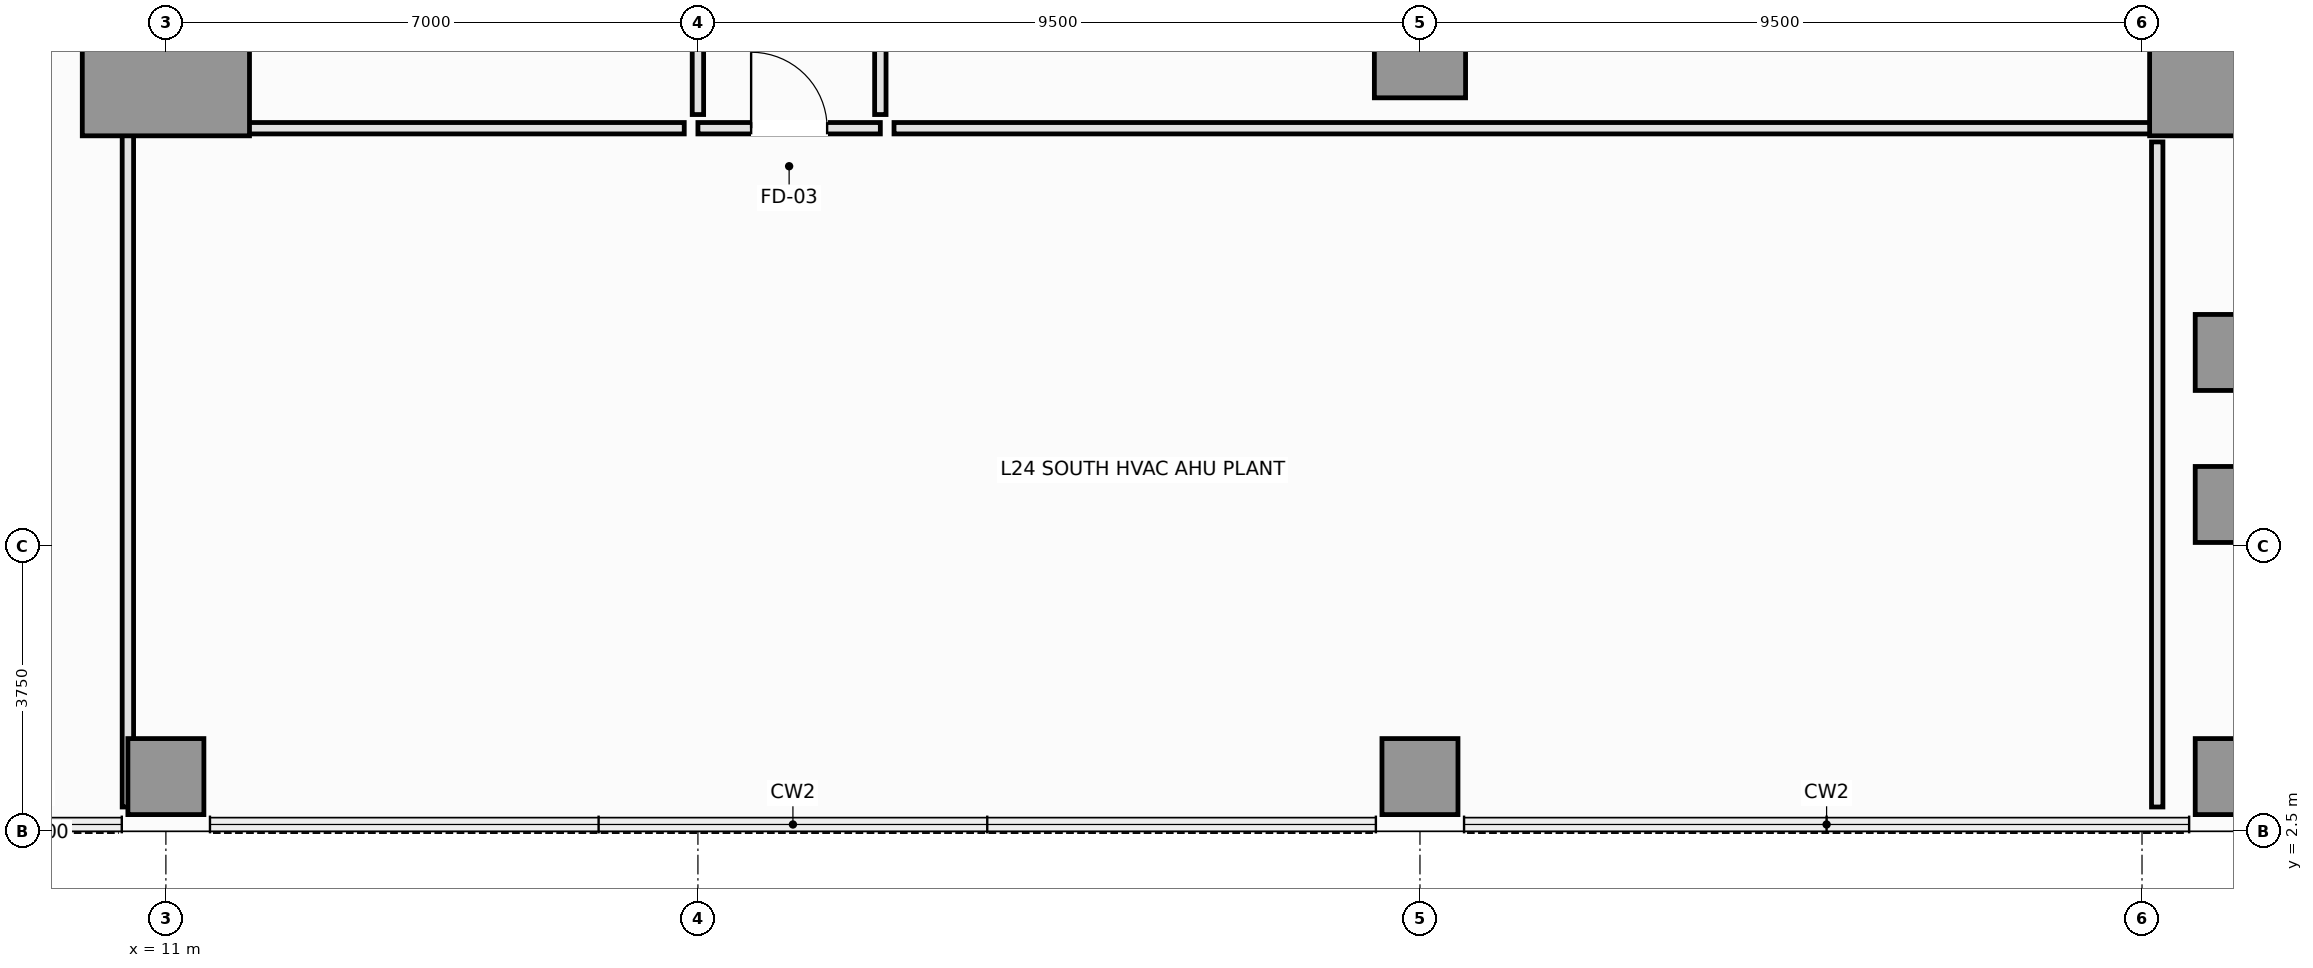
"""IFC4 building model, lengths in metres.
Left out: names, types, materials, properties, quantities, classifications, styles, units other than length and angle.
Written with IfcOpenShell. Run it as: python <this file> out.ifc"""

import sys

from ifc_helpers import new_model, si_unit, direction, frame, frame_2d, origin, origin_2d, place, context, subcontext, project, spatial, rectangle, extrude, element, fill, save


model = new_model("IFC4")
c1 = context("Model", 3, precision=1e-05, world=origin(), true_north=direction((0.0, 1.0)))
c2 = subcontext(c1, "Body", "Model", "MODEL_VIEW")
j1 = project(units=[si_unit("LENGTHUNIT", "METRE"), si_unit("PLANEANGLEUNIT", "RADIAN")], contexts=[c1])
p1 = place(None, origin())
s1 = spatial("IfcSite", under=j1, at=p1, CompositionType="ELEMENT")
p2 = place(p1, origin())
s2 = spatial("IfcBuilding", under=s1, at=p2, CompositionType="ELEMENT")
p3 = place(p2, frame((0.0, 0.0, 93.05)))
s3 = spatial("IfcBuildingStorey", under=s2, at=p3, CompositionType="ELEMENT", Elevation=93.05)
for number, where, z_axis, x_axis in (
    (1, (11.0, 12.75, 0.0), (0.0, 0.0, 1.0), (1.0, 0.0, 0.0)),
    (2, (38.2, 12.75, 0.0), (0.0, 0.0, 1.0), (1.0, 0.0, 0.0)),
):
    element("IfcColumn", number, at=place(p3, frame(where, z_axis=z_axis, x_axis=x_axis)), inside=s3, PredefinedType="COLUMN", context=c2, shape_type="SweptSolid", body=[
        extrude(rectangle(XDim=2.2, YDim=2.2, at=origin_2d()), origin(), (0.0, 0.0, 1.0), 4.8),
    ])
p4 = place(p3, frame((27.5, 12.75, 0.0), z_axis=(0.0, 0.0, 1.0), x_axis=(1.0, 0.0, 0.0)))
e3 = element("IfcColumn", 3, at=p4, inside=s3, PredefinedType="COLUMN", context=c2, shape_type="SweptSolid", body=[
    extrude(rectangle(XDim=1.2, YDim=1.2, at=origin_2d()), origin(), (0.0, 0.0, 1.0), 4.8),
])
for number, where, z_axis, x_axis in (
    (4, (38.2, 6.8, 0.0), (0.0, 0.0, 1.0), (1.0, 0.0, 0.0)),
    (5, (38.2, 8.8, 0.0), (0.0, 0.0, 1.0), (1.0, 0.0, 0.0)),
    (6, (11.0, 3.22, 0.0), (0.0, 0.0, 1.0), (1.0, 0.0, 0.0)),
    (7, (27.5, 3.22, 0.0), (0.0, 0.0, 1.0), (1.0, 0.0, 0.0)),
    (8, (38.2, 3.22, 0.0), (0.0, 0.0, 1.0), (1.0, 0.0, 0.0)),
):
    element("IfcColumn", number, at=place(p3, frame(where, z_axis=z_axis, x_axis=x_axis)), inside=s3, PredefinedType="COLUMN", context=c2, shape_type="SweptSolid", body=[
        extrude(rectangle(XDim=1.0, YDim=1.0, at=origin_2d()), origin(), (0.0, 0.0, 1.0), 4.8),
    ])
p5 = place(p3, frame((18.0, 11.75, 0.0), z_axis=(0.0, 0.0, 1.0), x_axis=(1.0, 0.0, 0.0)))
e9 = element("IfcWall", 9, at=p5, inside=s3, PredefinedType="PARTITIONING", context=c2, shape_type="SweptSolid", body=[
    extrude(rectangle(XDim=2.4, YDim=0.15, at=frame_2d((1.2, 0.0))), origin(), (0.0, 0.0, 1.0), 4.62),
])
p6 = place(p5, frame((0.7, 0.0, 0.0)))
e10 = element("IfcOpeningElement", 10, at=p6, cuts=e9, PredefinedType="OPENING", context=c2, shape_type="SweptSolid", body=[
    extrude(rectangle(XDim=1.0, YDim=2.15, at=frame_2d((0.5, 1.075))), frame((0.0, 0.085, 0.0), z_axis=(0.0, -1.0, 0.0), x_axis=(1.0, 0.0, 0.0)), (0.0, 0.0, 1.0), 0.17),
])
p7 = place(p3, frame((20.4, 13.52, 0.0), z_axis=(0.0, 0.0, 1.0), x_axis=(0.0, -1.0, 0.0)))
e11 = element("IfcWall", 11, at=p7, inside=s3, PredefinedType="PARTITIONING", context=c2, shape_type="SweptSolid", body=[
    extrude(rectangle(XDim=1.59, YDim=0.15, at=frame_2d((0.795, 0.0))), origin(), (0.0, 0.0, 1.0), 4.62),
])
p8 = place(p3, frame((20.58, 11.75, 0.0), z_axis=(0.0, 0.0, 1.0), x_axis=(1.0, 0.0, 0.0)))
e12 = element("IfcWall", 12, at=p8, inside=s3, PredefinedType="PARTITIONING", context=c2, shape_type="SweptSolid", body=[
    extrude(rectangle(XDim=16.62, YDim=0.15, at=frame_2d((8.31, 0.0))), origin(), (0.0, 0.0, 1.0), 4.62),
])
p9 = place(p3, frame((37.2, 11.57, 0.0), z_axis=(0.0, 0.0, 1.0), x_axis=(0.0, -1.0, 0.0)))
e13 = element("IfcWall", 13, at=p9, inside=s3, PredefinedType="PARTITIONING", context=c2, shape_type="SweptSolid", body=[
    extrude(rectangle(XDim=8.75, YDim=0.15, at=frame_2d((4.375, 0.0))), origin(), (0.0, 0.0, 1.0), 4.62),
])
p10 = place(p3, frame((10.5, 2.82, 0.0), z_axis=(0.0, 0.0, 1.0), x_axis=(0.0, 1.0, 0.0)))
e14 = element("IfcWall", 14, at=p10, inside=s3, PredefinedType="PARTITIONING", context=c2, shape_type="SweptSolid", body=[
    extrude(rectangle(XDim=8.93, YDim=0.15, at=frame_2d((4.465, 0.0))), origin(), (0.0, 0.0, 1.0), 2.6),
])
p11 = place(p3, frame((10.68, 11.75, 0.0), z_axis=(0.0, 0.0, 1.0), x_axis=(1.0, 0.0, 0.0)))
e15 = element("IfcWall", 15, at=p11, inside=s3, PredefinedType="PARTITIONING", context=c2, shape_type="SweptSolid", body=[
    extrude(rectangle(XDim=7.14, YDim=0.15, at=frame_2d((3.57, 0.0))), origin(), (0.0, 0.0, 1.0), 4.62),
])
p12 = place(p3, frame((18.0, 11.93, 0.0), z_axis=(0.0, 0.0, 1.0), x_axis=(0.0, 1.0, 0.0)))
e16 = element("IfcWall", 16, at=p12, inside=s3, PredefinedType="PARTITIONING", context=c2, shape_type="SweptSolid", body=[
    extrude(rectangle(XDim=1.85, YDim=0.15, at=frame_2d((0.925, 0.0))), origin(), (0.0, 0.0, 1.0), 4.62),
])
p13 = place(p6, origin())
e17 = element("IfcDoor", 17, at=p13, inside=s3, OperationType="SINGLE_SWING_LEFT", PredefinedType="DOOR", context=c2, shape_type="SweptSolid", body=[
    extrude(rectangle(XDim=1.0, YDim=2.15, at=frame_2d((0.5, 1.075))), frame((0.0, 0.025, 0.0), z_axis=(0.0, -1.0, 0.0), x_axis=(1.0, 0.0, 0.0)), (0.0, 0.0, 1.0), 0.05),
])
fill(e10, e17)
save(model, sys.argv[1])
